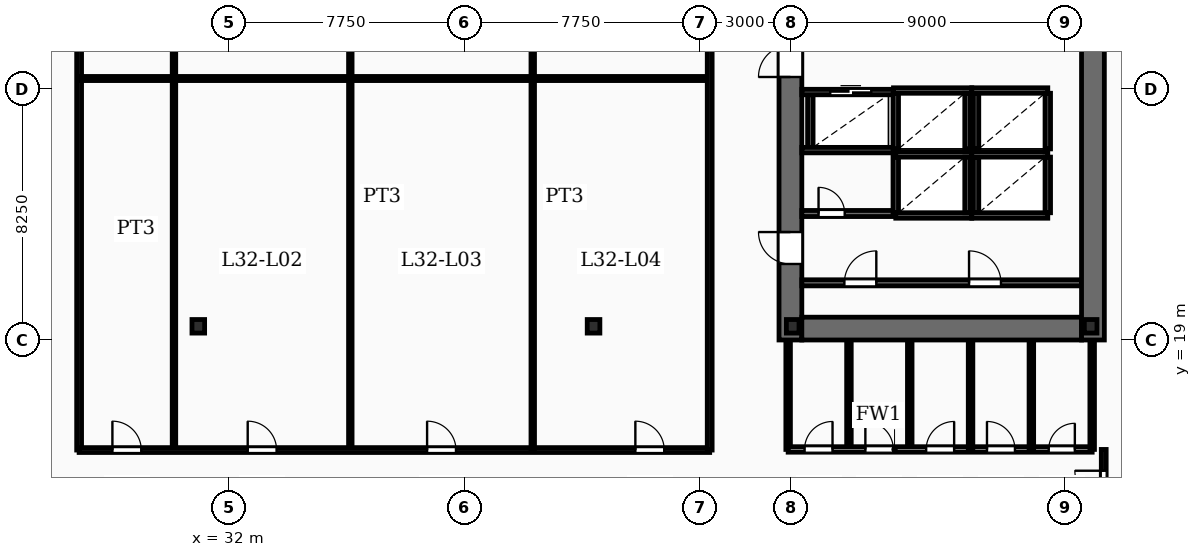
"""IFC4 building model, lengths in metres.
Left out: names, types, materials, properties, quantities, classifications, styles, units other than length and angle.
Written with IfcOpenShell. Run it as: python <this file> out.ifc"""

import sys

from ifc_helpers import new_model, si_unit, direction, frame, frame_2d, origin, origin_2d, place, context, subcontext, project, spatial, rectangle, i_section, extrude, element, fill, save


model = new_model("IFC4")
c1 = context("Model", 3, precision=1e-05, world=origin(), true_north=direction((0.0, 1.0)))
c2 = subcontext(c1, "Body", "Model", "MODEL_VIEW")
j1 = project(units=[si_unit("LENGTHUNIT", "METRE"), si_unit("PLANEANGLEUNIT", "RADIAN")], contexts=[c1])
p1 = place(None, origin())
s1 = spatial("IfcSite", under=j1, at=p1, CompositionType="ELEMENT")
p2 = place(p1, origin())
s2 = spatial("IfcBuilding", under=s1, at=p2, CompositionType="ELEMENT")
p3 = place(p2, frame((0.0, 0.0, 138.25)))
s3 = spatial("IfcBuildingStorey", under=s2, at=p3, CompositionType="ELEMENT", Elevation=138.25)
p4 = place(p3, frame((50.475, 19.0, -0.27), z_axis=(0.0, 0.0, 1.0), x_axis=(0.0, 1.0, 0.0)))
e1 = element("IfcWall", 1, at=p4, inside=s3, PredefinedType="SHEAR", context=c2, shape_type="SweptSolid", body=[
    extrude(rectangle(XDim=20.8, YDim=0.75, at=frame_2d((10.4, 0.0))), origin(), (0.0, 0.0, 1.0), 3.75),
])
p5 = place(p4, frame((2.5, 0.0, 0.27)))
e2 = element("IfcOpeningElement", 2, at=p5, cuts=e1, PredefinedType="OPENING", context=c2, shape_type="SweptSolid", body=[
    extrude(rectangle(XDim=1.05, YDim=2.15, at=frame_2d((0.525, 1.075))), frame((0.0, 0.385, 0.0), z_axis=(0.0, -1.0, 0.0), x_axis=(1.0, 0.0, 0.0)), (0.0, 0.0, 1.0), 0.77),
])
p6 = place(p4, frame((8.65, 0.0, 0.27)))
e3 = element("IfcOpeningElement", 3, at=p6, cuts=e1, PredefinedType="OPENING", context=c2, shape_type="SweptSolid", body=[
    extrude(rectangle(XDim=1.05, YDim=2.15, at=frame_2d((0.525, 1.075))), frame((0.0, 0.385, 0.0), z_axis=(0.0, -1.0, 0.0), x_axis=(1.0, 0.0, 0.0)), (0.0, 0.0, 1.0), 0.77),
])
p7 = place(p4, frame((14.62, 0.0, 0.27)))
e4 = element("IfcOpeningElement", 4, at=p7, cuts=e1, PredefinedType="OPENING", context=c2, shape_type="SweptSolid", body=[
    extrude(rectangle(XDim=1.1, YDim=2.15, at=frame_2d((0.55, 1.075))), frame((0.0, 0.385, 0.0), z_axis=(0.0, -1.0, 0.0), x_axis=(1.0, 0.0, 0.0)), (0.0, 0.0, 1.0), 0.77),
])
p8 = place(p3, frame((60.425, 19.0, -0.27), z_axis=(0.0, 0.0, 1.0), x_axis=(0.0, 1.0, 0.0)))
e5 = element("IfcWall", 5, at=p8, inside=s3, PredefinedType="SHEAR", context=c2, shape_type="SweptSolid", body=[
    extrude(rectangle(XDim=20.8, YDim=0.75, at=frame_2d((10.4, 0.0))), origin(), (0.0, 0.0, 1.0), 3.75),
])
p9 = place(p3, frame((50.85, 19.375, -0.27), z_axis=(0.0, 0.0, 1.0), x_axis=(1.0, 0.0, 0.0)))
e6 = element("IfcWall", 6, at=p9, inside=s3, PredefinedType="SHEAR", context=c2, shape_type="SweptSolid", body=[
    extrude(rectangle(XDim=9.2, YDim=0.75, at=frame_2d((4.6, 0.0))), origin(), (0.0, 0.0, 1.0), 3.75),
])
for number, where, z_axis, x_axis in (
    (7, (50.55, 19.45, -0.27), (0.0, 0.0, 1.0), (1.0, 0.0, 0.0)),
    (8, (60.35, 19.45, -0.27), (0.0, 0.0, 1.0), (1.0, 0.0, 0.0)),
    (9, (31.0, 19.45, -0.27), (0.0, 0.0, 1.0), (1.0, 0.0, 0.0)),
    (10, (44.0, 19.45, -0.27), (0.0, 0.0, 1.0), (1.0, 0.0, 0.0)),
):
    element("IfcColumn", number, at=place(p3, frame(where, z_axis=z_axis, x_axis=x_axis)), inside=s3, PredefinedType="COLUMN", context=c2, shape_type="SweptSolid", body=[
        extrude(i_section(OverallWidth=0.416, OverallDepth=0.446, WebThickness=0.039, FlangeThickness=0.063, FilletRadius=0.02, at=origin_2d()), origin(), (0.0, 0.0, 1.0), 3.75),
    ])
for number, where, z_axis, x_axis in (
    (11, (53.94, 25.105, 0.0), (0.0, 0.0, 1.0), (1.0, 0.0, 0.0)),
    (12, (53.94, 23.095, 0.0), (0.0, 0.0, 1.0), (1.0, 0.0, 0.0)),
):
    element("IfcWall", number, at=place(p3, frame(where, z_axis=z_axis, x_axis=x_axis)), inside=s3, PredefinedType="SOLIDWALL", context=c2, shape_type="SweptSolid", body=[
        extrude(rectangle(XDim=2.5, YDim=0.18, at=frame_2d((1.25, 0.0))), origin(), (0.0, 0.0, 1.0), 3.48),
    ])
for number, where, z_axis, x_axis in (
    (13, (53.94, 23.185, 0.0), (0.0, 0.0, 1.0), (0.0, 1.0, 0.0)),
    (14, (56.3, 23.185, 0.0), (0.0, 0.0, 1.0), (0.0, 1.0, 0.0)),
):
    element("IfcWall", number, at=place(p3, frame(where, z_axis=z_axis, x_axis=x_axis)), inside=s3, PredefinedType="SOLIDWALL", context=c2, shape_type="SweptSolid", body=[
        extrude(rectangle(XDim=1.83, YDim=0.18, at=frame_2d((0.915, 0.0))), origin(), (0.0, 0.0, 1.0), 3.48),
    ])
for number, where, z_axis, x_axis in (
    (15, (56.44, 25.105, 0.0), (0.0, 0.0, 1.0), (1.0, 0.0, 0.0)),
    (16, (56.44, 23.095, 0.0), (0.0, 0.0, 1.0), (1.0, 0.0, 0.0)),
):
    element("IfcWall", number, at=place(p3, frame(where, z_axis=z_axis, x_axis=x_axis)), inside=s3, PredefinedType="SOLIDWALL", context=c2, shape_type="SweptSolid", body=[
        extrude(rectangle(XDim=2.5, YDim=0.18, at=frame_2d((1.25, 0.0))), origin(), (0.0, 0.0, 1.0), 3.48),
    ])
for number, where, z_axis, x_axis in (
    (17, (56.58, 23.185, 0.0), (0.0, 0.0, 1.0), (0.0, 1.0, 0.0)),
    (18, (58.94, 23.185, 0.0), (0.0, 0.0, 1.0), (0.0, 1.0, 0.0)),
):
    element("IfcWall", number, at=place(p3, frame(where, z_axis=z_axis, x_axis=x_axis)), inside=s3, PredefinedType="SOLIDWALL", context=c2, shape_type="SweptSolid", body=[
        extrude(rectangle(XDim=1.83, YDim=0.18, at=frame_2d((0.915, 0.0))), origin(), (0.0, 0.0, 1.0), 3.48),
    ])
p10 = place(p3, frame((53.865, 27.205, 0.0), z_axis=(0.0, 0.0, 1.0), x_axis=(1.0, 0.0, 0.0)))
e19 = element("IfcWall", 19, at=p10, inside=s3, PredefinedType="SOLIDWALL", context=c2, shape_type="SweptSolid", body=[
    extrude(rectangle(XDim=2.575, YDim=0.18, at=frame_2d((1.288, 0.0))), origin(), (0.0, 0.0, 1.0), 3.48),
])
for number, where, z_axis, x_axis in (
    (20, (53.94, 25.285, 0.0), (0.0, 0.0, 1.0), (0.0, 1.0, 0.0)),
    (21, (56.3, 25.285, 0.0), (0.0, 0.0, 1.0), (0.0, 1.0, 0.0)),
):
    element("IfcWall", number, at=place(p3, frame(where, z_axis=z_axis, x_axis=x_axis)), inside=s3, PredefinedType="SOLIDWALL", context=c2, shape_type="SweptSolid", body=[
        extrude(rectangle(XDim=1.83, YDim=0.18, at=frame_2d((0.915, 0.0))), origin(), (0.0, 0.0, 1.0), 3.48),
    ])
p11 = place(p3, frame((56.44, 27.205, 0.0), z_axis=(0.0, 0.0, 1.0), x_axis=(1.0, 0.0, 0.0)))
e22 = element("IfcWall", 22, at=p11, inside=s3, PredefinedType="SOLIDWALL", context=c2, shape_type="SweptSolid", body=[
    extrude(rectangle(XDim=2.5, YDim=0.18, at=frame_2d((1.25, 0.0))), origin(), (0.0, 0.0, 1.0), 3.48),
])
for number, where, z_axis, x_axis in (
    (23, (56.58, 25.285, 0.0), (0.0, 0.0, 1.0), (0.0, 1.0, 0.0)),
    (24, (58.94, 25.285, 0.0), (0.0, 0.0, 1.0), (0.0, 1.0, 0.0)),
):
    element("IfcWall", number, at=place(p3, frame(where, z_axis=z_axis, x_axis=x_axis)), inside=s3, PredefinedType="SOLIDWALL", context=c2, shape_type="SweptSolid", body=[
        extrude(rectangle(XDim=1.83, YDim=0.18, at=frame_2d((0.915, 0.0))), origin(), (0.0, 0.0, 1.0), 3.48),
    ])
p12 = place(p3, frame((50.85, 27.155, 0.0), z_axis=(0.0, 0.0, 1.0), x_axis=(1.0, 0.0, 0.0)))
e25 = element("IfcWall", 25, at=p12, inside=s3, PredefinedType="SOLIDWALL", context=c2, shape_type="SweptSolid", body=[
    extrude(rectangle(XDim=3.015, YDim=0.18, at=frame_2d((1.507, 0.0))), origin(), (0.0, 0.0, 1.0), 3.48),
])
p13 = place(p12, frame((0.935, 0.0, 0.0)))
e26 = element("IfcOpeningElement", 26, at=p13, cuts=e25, PredefinedType="OPENING", context=c2, shape_type="SweptSolid", body=[
    extrude(rectangle(XDim=1.35, YDim=2.3, at=frame_2d((0.675, 1.15))), frame((0.0, 0.1, 0.0), z_axis=(0.0, -1.0, 0.0), x_axis=(1.0, 0.0, 0.0)), (0.0, 0.0, 1.0), 0.2),
])
p14 = place(p3, frame((50.85, 25.245, 0.0), z_axis=(0.0, 0.0, 1.0), x_axis=(1.0, 0.0, 0.0)))
e27 = element("IfcWall", 27, at=p14, inside=s3, PredefinedType="SOLIDWALL", context=c2, shape_type="SweptSolid", body=[
    extrude(rectangle(XDim=3.015, YDim=0.18, at=frame_2d((1.507, 0.0))), origin(), (0.0, 0.0, 1.0), 3.48),
])
p15 = place(p3, frame((51.13, 25.335, 0.0), z_axis=(0.0, 0.0, 1.0), x_axis=(0.0, 1.0, 0.0)))
e28 = element("IfcWall", 28, at=p15, inside=s3, PredefinedType="SOLIDWALL", context=c2, shape_type="SweptSolid", body=[
    extrude(rectangle(XDim=1.73, YDim=0.18, at=frame_2d((0.865, 0.0))), origin(), (0.0, 0.0, 1.0), 3.48),
])
p16 = place(p3, frame((50.85, 20.88, 0.0), z_axis=(0.0, 0.0, 1.0), x_axis=(1.0, 0.0, 0.0)))
e29 = element("IfcWall", 29, at=p16, inside=s3, PredefinedType="SOLIDWALL", context=c2, shape_type="SweptSolid", body=[
    extrude(rectangle(XDim=9.2, YDim=0.2, at=frame_2d((4.6, 0.0))), origin(), (0.0, 0.0, 1.0), 2.54),
])
p17 = place(p16, frame((1.4, 0.0, 0.0)))
e30 = element("IfcOpeningElement", 30, at=p17, cuts=e29, PredefinedType="OPENING", context=c2, shape_type="SweptSolid", body=[
    extrude(rectangle(XDim=1.05, YDim=2.15, at=frame_2d((0.525, 1.075))), frame((0.0, 0.11, 0.0), z_axis=(0.0, -1.0, 0.0), x_axis=(1.0, 0.0, 0.0)), (0.0, 0.0, 1.0), 0.22),
])
p18 = place(p16, frame((5.5, 0.0, 0.0)))
e31 = element("IfcOpeningElement", 31, at=p18, cuts=e29, PredefinedType="OPENING", context=c2, shape_type="SweptSolid", body=[
    extrude(rectangle(XDim=1.05, YDim=2.15, at=frame_2d((0.525, 1.075))), frame((0.0, 0.11, 0.0), z_axis=(0.0, -1.0, 0.0), x_axis=(1.0, 0.0, 0.0)), (0.0, 0.0, 1.0), 0.22),
])
p19 = place(p3, frame((50.85, 23.16, 0.0), z_axis=(0.0, 0.0, 1.0), x_axis=(1.0, 0.0, 0.0)))
e32 = element("IfcWall", 32, at=p19, inside=s3, PredefinedType="SOLIDWALL", context=c2, shape_type="SweptSolid", body=[
    extrude(rectangle(XDim=3.03, YDim=0.2, at=frame_2d((1.515, 0.0))), origin(), (0.0, 0.0, 1.0), 2.54),
])
p20 = place(p19, frame((0.55, 0.0, 0.0)))
e33 = element("IfcOpeningElement", 33, at=p20, cuts=e32, PredefinedType="OPENING", context=c2, shape_type="SweptSolid", body=[
    extrude(rectangle(XDim=0.86, YDim=2.05, at=frame_2d((0.43, 1.025))), frame((0.0, 0.11, 0.0), z_axis=(0.0, -1.0, 0.0), x_axis=(1.0, 0.0, 0.0)), (0.0, 0.0, 1.0), 0.22),
])
for number, where, z_axis, x_axis in (
    (34, (52.4, 15.4, 0.0), (0.0, 0.0, 1.0), (0.0, 1.0, 0.0)),
    (35, (54.4, 15.4, 0.0), (0.0, 0.0, 1.0), (0.0, 1.0, 0.0)),
    (36, (56.4, 15.4, 0.0), (0.0, 0.0, 1.0), (0.0, 1.0, 0.0)),
    (37, (58.4, 15.4, 0.0), (0.0, 0.0, 1.0), (0.0, 1.0, 0.0)),
):
    element("IfcWall", number, at=place(p3, frame(where, z_axis=z_axis, x_axis=x_axis)), inside=s3, PredefinedType="PARTITIONING", context=c2, shape_type="SweptSolid", body=[
        extrude(rectangle(XDim=3.58, YDim=0.15, at=frame_2d((1.79, 0.0))), origin(), (0.0, 0.0, 1.0), 2.54),
    ])
p21 = place(p3, frame((50.4, 15.4, 0.0), z_axis=(0.0, 0.0, 1.0), x_axis=(1.0, 0.0, 0.0)))
e38 = element("IfcWall", 38, at=p21, inside=s3, PredefinedType="SOLIDWALL", context=c2, shape_type="SweptSolid", body=[
    extrude(rectangle(XDim=10.0, YDim=0.18, at=frame_2d((5.0, 0.0))), origin(), (0.0, 0.0, 1.0), 2.54),
])
p22 = place(p21, frame((0.54, 0.0, 0.0)))
e39 = element("IfcOpeningElement", 39, at=p22, cuts=e38, PredefinedType="OPENING", context=c2, shape_type="SweptSolid", body=[
    extrude(rectangle(XDim=0.92, YDim=2.1, at=frame_2d((0.46, 1.05))), frame((0.0, 0.1, 0.0), z_axis=(0.0, -1.0, 0.0), x_axis=(1.0, 0.0, 0.0)), (0.0, 0.0, 1.0), 0.2),
])
p23 = place(p21, frame((2.54, 0.0, 0.0)))
e40 = element("IfcOpeningElement", 40, at=p23, cuts=e38, PredefinedType="OPENING", context=c2, shape_type="SweptSolid", body=[
    extrude(rectangle(XDim=0.92, YDim=2.1, at=frame_2d((0.46, 1.05))), frame((0.0, 0.1, 0.0), z_axis=(0.0, -1.0, 0.0), x_axis=(1.0, 0.0, 0.0)), (0.0, 0.0, 1.0), 0.2),
])
p24 = place(p21, frame((4.54, 0.0, 0.0)))
e41 = element("IfcOpeningElement", 41, at=p24, cuts=e38, PredefinedType="OPENING", context=c2, shape_type="SweptSolid", body=[
    extrude(rectangle(XDim=0.92, YDim=2.1, at=frame_2d((0.46, 1.05))), frame((0.0, 0.1, 0.0), z_axis=(0.0, -1.0, 0.0), x_axis=(1.0, 0.0, 0.0)), (0.0, 0.0, 1.0), 0.2),
])
p25 = place(p21, frame((6.54, 0.0, 0.0)))
e42 = element("IfcOpeningElement", 42, at=p25, cuts=e38, PredefinedType="OPENING", context=c2, shape_type="SweptSolid", body=[
    extrude(rectangle(XDim=0.92, YDim=2.1, at=frame_2d((0.46, 1.05))), frame((0.0, 0.1, 0.0), z_axis=(0.0, -1.0, 0.0), x_axis=(1.0, 0.0, 0.0)), (0.0, 0.0, 1.0), 0.2),
])
p26 = place(p21, frame((8.57, 0.0, 0.0)))
e43 = element("IfcOpeningElement", 43, at=p26, cuts=e38, PredefinedType="OPENING", context=c2, shape_type="SweptSolid", body=[
    extrude(rectangle(XDim=0.86, YDim=2.05, at=frame_2d((0.43, 1.025))), frame((0.0, 0.1, 0.0), z_axis=(0.0, -1.0, 0.0), x_axis=(1.0, 0.0, 0.0)), (0.0, 0.0, 1.0), 0.2),
])
for number, where, z_axis, x_axis in (
    (44, (50.4, 15.4, 0.0), (0.0, 0.0, 1.0), (0.0, 1.0, 0.0)),
    (45, (60.4, 15.4, 0.0), (0.0, 0.0, 1.0), (0.0, 1.0, 0.0)),
):
    element("IfcWall", number, at=place(p3, frame(where, z_axis=z_axis, x_axis=x_axis)), inside=s3, PredefinedType="PARTITIONING", context=c2, shape_type="SweptSolid", body=[
        extrude(rectangle(XDim=3.58, YDim=0.15, at=frame_2d((1.79, 0.0))), origin(), (0.0, 0.0, 1.0), 2.54),
    ])
for number, where, z_axis, x_axis in (
    (46, (30.2, 15.38, 0.0), (0.0, 0.0, 1.0), (0.0, 1.0, 0.0)),
    (47, (36.0, 15.38, 0.0), (0.0, 0.0, 1.0), (0.0, 1.0, 0.0)),
    (48, (42.0, 15.38, 0.0), (0.0, 0.0, 1.0), (0.0, 1.0, 0.0)),
):
    element("IfcWall", number, at=place(p3, frame(where, z_axis=z_axis, x_axis=x_axis)), inside=s3, PredefinedType="PARTITIONING", context=c2, shape_type="SweptSolid", body=[
        extrude(rectangle(XDim=20.8, YDim=0.115, at=frame_2d((10.4, 0.0))), origin(), (0.0, 0.0, 1.0), 2.54),
    ])
p27 = place(p3, frame((27.08, 27.6, 0.0), z_axis=(0.0, 0.0, 1.0), x_axis=(1.0, 0.0, 0.0)))
e49 = element("IfcWall", 49, at=p27, inside=s3, PredefinedType="PARTITIONING", context=c2, shape_type="SweptSolid", body=[
    extrude(rectangle(XDim=20.74, YDim=0.135, at=frame_2d((10.37, 0.0))), origin(), (0.0, 0.0, 1.0), 2.54),
])
p28 = place(p3, frame((27.08, 15.38, 0.0), z_axis=(0.0, 0.0, 1.0), x_axis=(1.0, 0.0, 0.0)))
e50 = element("IfcWall", 50, at=p28, inside=s3, PredefinedType="PARTITIONING", context=c2, shape_type="SweptSolid", body=[
    extrude(rectangle(XDim=20.74, YDim=0.16, at=frame_2d((10.37, 0.0))), origin(), (0.0, 0.0, 1.0), 2.54),
])
p29 = place(p28, frame((1.095, 0.0, 0.0)))
e51 = element("IfcOpeningElement", 51, at=p29, cuts=e50, PredefinedType="OPENING", context=c2, shape_type="SweptSolid", body=[
    extrude(rectangle(XDim=0.95, YDim=2.15, at=frame_2d((0.475, 1.075))), frame((0.0, 0.09, 0.0), z_axis=(0.0, -1.0, 0.0), x_axis=(1.0, 0.0, 0.0)), (0.0, 0.0, 1.0), 0.18),
])
p30 = place(p28, frame((5.545, 0.0, 0.0)))
e52 = element("IfcOpeningElement", 52, at=p30, cuts=e50, PredefinedType="OPENING", context=c2, shape_type="SweptSolid", body=[
    extrude(rectangle(XDim=0.95, YDim=2.15, at=frame_2d((0.475, 1.075))), frame((0.0, 0.09, 0.0), z_axis=(0.0, -1.0, 0.0), x_axis=(1.0, 0.0, 0.0)), (0.0, 0.0, 1.0), 0.18),
])
p31 = place(p28, frame((11.445, 0.0, 0.0)))
e53 = element("IfcOpeningElement", 53, at=p31, cuts=e50, PredefinedType="OPENING", context=c2, shape_type="SweptSolid", body=[
    extrude(rectangle(XDim=0.95, YDim=2.15, at=frame_2d((0.475, 1.075))), frame((0.0, 0.09, 0.0), z_axis=(0.0, -1.0, 0.0), x_axis=(1.0, 0.0, 0.0)), (0.0, 0.0, 1.0), 0.18),
])
p32 = place(p28, frame((18.295, 0.0, 0.0)))
e54 = element("IfcOpeningElement", 54, at=p32, cuts=e50, PredefinedType="OPENING", context=c2, shape_type="SweptSolid", body=[
    extrude(rectangle(XDim=0.95, YDim=2.15, at=frame_2d((0.475, 1.075))), frame((0.0, 0.09, 0.0), z_axis=(0.0, -1.0, 0.0), x_axis=(1.0, 0.0, 0.0)), (0.0, 0.0, 1.0), 0.18),
])
for number, where, z_axis, x_axis in (
    (55, (27.08, 15.38, 0.0), (0.0, 0.0, 1.0), (0.0, 1.0, 0.0)),
    (56, (47.82, 15.38, 0.0), (0.0, 0.0, 1.0), (0.0, 1.0, 0.0)),
):
    element("IfcWall", number, at=place(p3, frame(where, z_axis=z_axis, x_axis=x_axis)), inside=s3, PredefinedType="PARTITIONING", context=c2, shape_type="SweptSolid", body=[
        extrude(rectangle(XDim=20.8, YDim=0.16, at=frame_2d((10.4, 0.0))), origin(), (0.0, 0.0, 1.0), 2.54),
    ])
p33 = place(p3, frame((60.78, 13.1, 0.0), z_axis=(0.0, 0.0, 1.0), x_axis=(0.0, 1.0, 0.0)))
e57 = element("IfcWall", 57, at=p33, inside=s3, PredefinedType="PARTITIONING", context=c2, shape_type="SweptSolid", body=[
    extrude(rectangle(XDim=2.3, YDim=0.16, at=frame_2d((1.15, 0.0))), origin(), (0.0, 0.0, 1.0), 2.54),
])
p34 = place(p33, frame((0.65, 0.0, 0.0)))
e58 = element("IfcOpeningElement", 58, at=p34, cuts=e57, PredefinedType="OPENING", context=c2, shape_type="SweptSolid", body=[
    extrude(rectangle(XDim=0.95, YDim=2.15, at=frame_2d((0.475, 1.075))), frame((0.0, 0.09, 0.0), z_axis=(0.0, -1.0, 0.0), x_axis=(1.0, 0.0, 0.0)), (0.0, 0.0, 1.0), 0.18),
])
p35 = place(p5, origin())
e59 = element("IfcDoor", 59, at=p35, inside=s3, OperationType="SINGLE_SWING_RIGHT", PredefinedType="DOOR", context=c2, shape_type="SweptSolid", body=[
    extrude(rectangle(XDim=1.05, YDim=2.15, at=frame_2d((0.525, 1.075))), frame((0.0, 0.025, 0.0), z_axis=(0.0, -1.0, 0.0), x_axis=(1.0, 0.0, 0.0)), (0.0, 0.0, 1.0), 0.05),
])
fill(e2, e59)
p36 = place(p6, origin())
e60 = element("IfcDoor", 60, at=p36, inside=s3, OperationType="SINGLE_SWING_LEFT", PredefinedType="DOOR", context=c2, shape_type="SweptSolid", body=[
    extrude(rectangle(XDim=1.05, YDim=2.15, at=frame_2d((0.525, 1.075))), frame((0.0, 0.025, 0.0), z_axis=(0.0, -1.0, 0.0), x_axis=(1.0, 0.0, 0.0)), (0.0, 0.0, 1.0), 0.05),
])
fill(e3, e60)
p37 = place(p13, origin())
e61 = element("IfcDoor", 61, at=p37, inside=s3, OperationType="DOUBLE_DOOR_SLIDING", PredefinedType="DOOR", context=c2, shape_type="SweptSolid", body=[
    extrude(rectangle(XDim=1.35, YDim=2.3, at=frame_2d((0.675, 1.15))), frame((0.0, 0.025, 0.0), z_axis=(0.0, -1.0, 0.0), x_axis=(1.0, 0.0, 0.0)), (0.0, 0.0, 1.0), 0.05),
])
fill(e26, e61)
p38 = place(p17, origin())
e62 = element("IfcDoor", 62, at=p38, inside=s3, OperationType="SINGLE_SWING_RIGHT", PredefinedType="DOOR", context=c2, shape_type="SweptSolid", body=[
    extrude(rectangle(XDim=1.05, YDim=2.15, at=frame_2d((0.525, 1.075))), frame((0.0, 0.025, 0.0), z_axis=(0.0, -1.0, 0.0), x_axis=(1.0, 0.0, 0.0)), (0.0, 0.0, 1.0), 0.05),
])
fill(e30, e62)
p39 = place(p18, origin())
e63 = element("IfcDoor", 63, at=p39, inside=s3, OperationType="SINGLE_SWING_LEFT", PredefinedType="DOOR", context=c2, shape_type="SweptSolid", body=[
    extrude(rectangle(XDim=1.05, YDim=2.15, at=frame_2d((0.525, 1.075))), frame((0.0, 0.025, 0.0), z_axis=(0.0, -1.0, 0.0), x_axis=(1.0, 0.0, 0.0)), (0.0, 0.0, 1.0), 0.05),
])
fill(e31, e63)
p40 = place(p20, origin())
e64 = element("IfcDoor", 64, at=p40, inside=s3, OperationType="SINGLE_SWING_LEFT", PredefinedType="DOOR", context=c2, shape_type="SweptSolid", body=[
    extrude(rectangle(XDim=0.86, YDim=2.05, at=frame_2d((0.43, 1.025))), frame((0.0, 0.025, 0.0), z_axis=(0.0, -1.0, 0.0), x_axis=(1.0, 0.0, 0.0)), (0.0, 0.0, 1.0), 0.05),
])
fill(e33, e64)
p41 = place(p22, origin())
e65 = element("IfcDoor", 65, at=p41, inside=s3, OperationType="SINGLE_SWING_RIGHT", PredefinedType="DOOR", context=c2, shape_type="SweptSolid", body=[
    extrude(rectangle(XDim=0.92, YDim=2.1, at=frame_2d((0.46, 1.05))), frame((0.0, 0.025, 0.0), z_axis=(0.0, -1.0, 0.0), x_axis=(1.0, 0.0, 0.0)), (0.0, 0.0, 1.0), 0.05),
])
fill(e39, e65)
p42 = place(p23, origin())
e66 = element("IfcDoor", 66, at=p42, inside=s3, OperationType="SINGLE_SWING_LEFT", PredefinedType="DOOR", context=c2, shape_type="SweptSolid", body=[
    extrude(rectangle(XDim=0.92, YDim=2.1, at=frame_2d((0.46, 1.05))), frame((0.0, 0.025, 0.0), z_axis=(0.0, -1.0, 0.0), x_axis=(1.0, 0.0, 0.0)), (0.0, 0.0, 1.0), 0.05),
])
fill(e40, e66)
p43 = place(p24, origin())
e67 = element("IfcDoor", 67, at=p43, inside=s3, OperationType="SINGLE_SWING_RIGHT", PredefinedType="DOOR", context=c2, shape_type="SweptSolid", body=[
    extrude(rectangle(XDim=0.92, YDim=2.1, at=frame_2d((0.46, 1.05))), frame((0.0, 0.025, 0.0), z_axis=(0.0, -1.0, 0.0), x_axis=(1.0, 0.0, 0.0)), (0.0, 0.0, 1.0), 0.05),
])
fill(e41, e67)
p44 = place(p25, origin())
e68 = element("IfcDoor", 68, at=p44, inside=s3, OperationType="SINGLE_SWING_LEFT", PredefinedType="DOOR", context=c2, shape_type="SweptSolid", body=[
    extrude(rectangle(XDim=0.92, YDim=2.1, at=frame_2d((0.46, 1.05))), frame((0.0, 0.025, 0.0), z_axis=(0.0, -1.0, 0.0), x_axis=(1.0, 0.0, 0.0)), (0.0, 0.0, 1.0), 0.05),
])
fill(e42, e68)
p45 = place(p26, origin())
e69 = element("IfcDoor", 69, at=p45, inside=s3, OperationType="SINGLE_SWING_RIGHT", PredefinedType="DOOR", context=c2, shape_type="SweptSolid", body=[
    extrude(rectangle(XDim=0.86, YDim=2.05, at=frame_2d((0.43, 1.025))), frame((0.0, 0.025, 0.0), z_axis=(0.0, -1.0, 0.0), x_axis=(1.0, 0.0, 0.0)), (0.0, 0.0, 1.0), 0.05),
])
fill(e43, e69)
p46 = place(p29, origin())
e70 = element("IfcDoor", 70, at=p46, inside=s3, OperationType="SINGLE_SWING_LEFT", PredefinedType="DOOR", context=c2, shape_type="SweptSolid", body=[
    extrude(rectangle(XDim=0.95, YDim=2.15, at=frame_2d((0.475, 1.075))), frame((0.0, 0.025, 0.0), z_axis=(0.0, -1.0, 0.0), x_axis=(1.0, 0.0, 0.0)), (0.0, 0.0, 1.0), 0.05),
])
fill(e51, e70)
p47 = place(p30, origin())
e71 = element("IfcDoor", 71, at=p47, inside=s3, OperationType="SINGLE_SWING_LEFT", PredefinedType="DOOR", context=c2, shape_type="SweptSolid", body=[
    extrude(rectangle(XDim=0.95, YDim=2.15, at=frame_2d((0.475, 1.075))), frame((0.0, 0.025, 0.0), z_axis=(0.0, -1.0, 0.0), x_axis=(1.0, 0.0, 0.0)), (0.0, 0.0, 1.0), 0.05),
])
fill(e52, e71)
p48 = place(p31, origin())
e72 = element("IfcDoor", 72, at=p48, inside=s3, OperationType="SINGLE_SWING_LEFT", PredefinedType="DOOR", context=c2, shape_type="SweptSolid", body=[
    extrude(rectangle(XDim=0.95, YDim=2.15, at=frame_2d((0.475, 1.075))), frame((0.0, 0.025, 0.0), z_axis=(0.0, -1.0, 0.0), x_axis=(1.0, 0.0, 0.0)), (0.0, 0.0, 1.0), 0.05),
])
fill(e53, e72)
p49 = place(p32, origin())
e73 = element("IfcDoor", 73, at=p49, inside=s3, OperationType="SINGLE_SWING_LEFT", PredefinedType="DOOR", context=c2, shape_type="SweptSolid", body=[
    extrude(rectangle(XDim=0.95, YDim=2.15, at=frame_2d((0.475, 1.075))), frame((0.0, 0.025, 0.0), z_axis=(0.0, -1.0, 0.0), x_axis=(1.0, 0.0, 0.0)), (0.0, 0.0, 1.0), 0.05),
])
fill(e54, e73)
p50 = place(p34, origin())
e74 = element("IfcDoor", 74, at=p50, inside=s3, OperationType="SINGLE_SWING_RIGHT", PredefinedType="DOOR", context=c2, shape_type="SweptSolid", body=[
    extrude(rectangle(XDim=0.95, YDim=2.15, at=frame_2d((0.475, 1.075))), frame((0.0, 0.025, 0.0), z_axis=(0.0, -1.0, 0.0), x_axis=(1.0, 0.0, 0.0)), (0.0, 0.0, 1.0), 0.05),
])
fill(e58, e74)
save(model, sys.argv[1])
